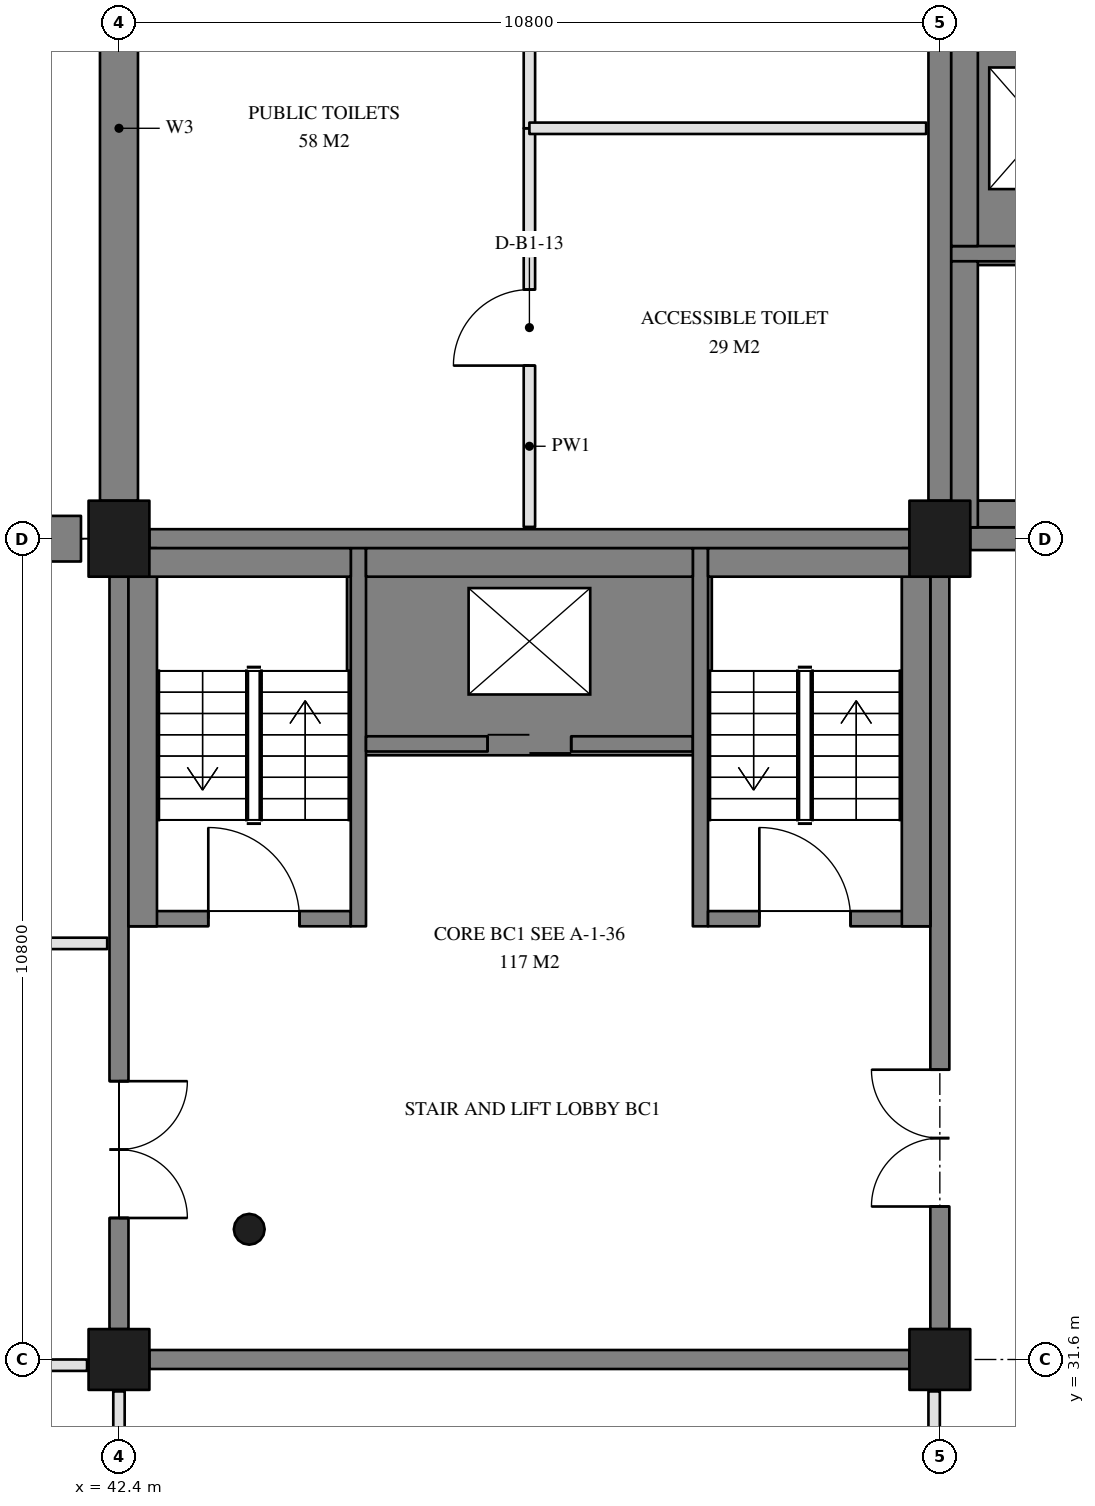
"""IFC4 building model, lengths in metres.
Left out: names, types, materials, properties, quantities, classifications, styles, units other than length and angle.
Written with IfcOpenShell. Run it as: python <this file> out.ifc"""

import sys

from ifc_helpers import new_model, si_unit, direction, frame, frame_2d, origin, origin_2d, place, context, subcontext, project, spatial, polyline, rectangle, hollow_circle, outline, extrude, element, fill, save


model = new_model("IFC4")
c1 = context("Model", 3, precision=1e-05, world=origin(), true_north=direction((0.0, 1.0)))
c2 = subcontext(c1, "Body", "Model", "MODEL_VIEW")
j1 = project(units=[si_unit("LENGTHUNIT", "METRE"), si_unit("PLANEANGLEUNIT", "RADIAN")], contexts=[c1])
p1 = place(None, origin())
s1 = spatial("IfcSite", under=j1, at=p1, CompositionType="ELEMENT")
p2 = place(p1, origin())
s2 = spatial("IfcBuilding", under=s1, at=p2, CompositionType="ELEMENT")
p3 = place(p2, frame((0.0, 0.0, -5.4)))
s3 = spatial("IfcBuildingStorey", under=s2, at=p3, CompositionType="ELEMENT", Elevation=-5.4)
for number, where, z_axis, x_axis in (
    (1, (42.4, 42.4, -0.4), (0.0, 0.0, 1.0), (1.0, 0.0, 0.0)),
    (2, (53.2, 42.4, -0.4), (0.0, 0.0, 1.0), (1.0, 0.0, 0.0)),
):
    element("IfcColumn", number, at=place(p3, frame(where, z_axis=z_axis, x_axis=x_axis)), inside=s3, PredefinedType="COLUMN", context=c2, shape_type="SweptSolid", body=[
        extrude(rectangle(XDim=0.8, YDim=1.0, at=origin_2d()), origin(), (0.0, 0.0, 1.0), 5.8),
    ])
for number, where, z_axis, x_axis in (
    (3, (42.4, 31.6, -0.4), (0.0, 0.0, 1.0), (1.0, 0.0, 0.0)),
    (4, (53.2, 31.6, -0.4), (0.0, 0.0, 1.0), (1.0, 0.0, 0.0)),
):
    element("IfcColumn", number, at=place(p3, frame(where, z_axis=z_axis, x_axis=x_axis)), inside=s3, PredefinedType="COLUMN", context=c2, shape_type="SweptSolid", body=[
        extrude(rectangle(XDim=0.8, YDim=0.8, at=origin_2d()), origin(), (0.0, 0.0, 1.0), 5.8),
    ])
p4 = place(p3, frame((44.114, 33.314, 3.6), z_axis=(0.0, 0.0, 1.0), x_axis=(1.0, 0.0, 0.0)))
e5 = element("IfcColumn", 5, at=p4, inside=s3, PredefinedType="COLUMN", context=c2, shape_type="SweptSolid", body=[
    extrude(hollow_circle(Radius=0.203, WallThickness=0.016, at=origin_2d()), origin(), (0.0, 0.0, 1.0), 1.8),
])
p5 = place(p3, frame((0.0, 0.0, -1.4)))
e6 = element("IfcWall", 6, at=p5, inside=s3, PredefinedType="SOLIDWALL", context=c2, shape_type="SweptSolid", body=[
    extrude(outline(polyline([(45.4, 39.55), (50.2, 39.55), (50.2, 42.15), (45.4, 42.15), (45.4, 39.55)]), holes=[polyline([(49.95, 39.8), (49.95, 41.9), (45.65, 41.9), (45.65, 39.8), (49.95, 39.8)])]), origin(), (0.0, 0.0, 1.0), 1.4),
])
p6 = place(p3, frame((0.0, 0.0, -1.4)))
e7 = element("IfcWall", 7, at=p6, inside=s3, PredefinedType="SOLIDWALL", context=c2, shape_type="SweptSolid", body=[
    extrude(outline(polyline([(56.05, 46.0), (56.05, 49.6), (53.45, 49.6), (53.45, 46.0), (56.05, 46.0)]), holes=[polyline([(55.8, 49.35), (53.7, 49.35), (53.7, 46.25), (55.8, 46.25), (55.8, 49.35)])]), origin(), (0.0, 0.0, 1.0), 1.4),
])
p7 = place(p3, frame((53.6, 42.4, 0.0), z_axis=(0.0, 0.0, 1.0), x_axis=(1.0, 0.0, 0.0)))
e8 = element("IfcWall", 8, at=p7, inside=s3, PredefinedType="SOLIDWALL", context=c2, shape_type="SweptSolid", body=[
    extrude(rectangle(XDim=10.0, YDim=0.3, at=frame_2d((5.0, 0.0))), origin(), (0.0, 0.0, 1.0), 5.4),
])
p8 = place(p7, frame((7.775, 0.0, 0.0)))
e9 = element("IfcOpeningElement", 9, at=p8, cuts=e8, PredefinedType="OPENING", context=c2, shape_type="SweptSolid", body=[
    extrude(rectangle(XDim=1.8, YDim=2.1, at=frame_2d((0.9, 1.05))), frame((0.0, 0.16, 0.0), z_axis=(0.0, -1.0, 0.0), x_axis=(1.0, 0.0, 0.0)), (0.0, 0.0, 1.0), 0.32),
])
p9 = place(p3, frame((53.2, 52.7, 0.0), z_axis=(0.0, 0.0, 1.0), x_axis=(0.0, -1.0, 0.0)))
e10 = element("IfcWall", 10, at=p9, inside=s3, PredefinedType="SOLIDWALL", context=c2, shape_type="SweptSolid", body=[
    extrude(rectangle(XDim=9.8, YDim=0.3, at=frame_2d((4.9, 0.0))), origin(), (0.0, 0.0, 1.0), 5.4),
])
p10 = place(p3, frame((42.8, 31.6, 0.0), z_axis=(0.0, 0.0, 1.0), x_axis=(1.0, 0.0, 0.0)))
e11 = element("IfcWall", 11, at=p10, inside=s3, PredefinedType="SOLIDWALL", context=c2, shape_type="SweptSolid", body=[
    extrude(rectangle(XDim=10.0, YDim=0.25, at=frame_2d((5.0, 0.0))), origin(), (0.0, 0.0, 1.0), 5.4),
])
p11 = place(p3, frame((53.2, 32.0, 0.0), z_axis=(0.0, 0.0, 1.0), x_axis=(0.0, 1.0, 0.0)))
e12 = element("IfcWall", 12, at=p11, inside=s3, PredefinedType="SOLIDWALL", context=c2, shape_type="SweptSolid", body=[
    extrude(rectangle(XDim=9.9, YDim=0.25, at=frame_2d((4.95, 0.0))), origin(), (0.0, 0.0, 1.0), 5.4),
])
p12 = place(p11, frame((1.613, 0.0, 0.0)))
e13 = element("IfcOpeningElement", 13, at=p12, cuts=e12, PredefinedType="OPENING", context=c2, shape_type="SweptSolid", body=[
    extrude(rectangle(XDim=1.8, YDim=2.1, at=frame_2d((0.9, 1.05))), frame((0.0, 0.135, 0.0), z_axis=(0.0, -1.0, 0.0), x_axis=(1.0, 0.0, 0.0)), (0.0, 0.0, 1.0), 0.27),
])
p13 = place(p3, frame((52.8, 42.4, 0.0), z_axis=(0.0, 0.0, 1.0), x_axis=(-1.0, 0.0, 0.0)))
e14 = element("IfcWall", 14, at=p13, inside=s3, PredefinedType="SOLIDWALL", context=c2, shape_type="SweptSolid", body=[
    extrude(rectangle(XDim=10.0, YDim=0.25, at=frame_2d((5.0, 0.0))), origin(), (0.0, 0.0, 1.0), 5.4),
])
p14 = place(p3, frame((42.4, 41.9, 0.0), z_axis=(0.0, 0.0, 1.0), x_axis=(0.0, -1.0, 0.0)))
e15 = element("IfcWall", 15, at=p14, inside=s3, PredefinedType="SOLIDWALL", context=c2, shape_type="SweptSolid", body=[
    extrude(rectangle(XDim=9.9, YDim=0.25, at=frame_2d((4.95, 0.0))), origin(), (0.0, 0.0, 1.0), 5.4),
])
p15 = place(p14, frame((6.638, 0.0, 0.0)))
e16 = element("IfcOpeningElement", 16, at=p15, cuts=e15, PredefinedType="OPENING", context=c2, shape_type="SweptSolid", body=[
    extrude(rectangle(XDim=1.8, YDim=2.1, at=frame_2d((0.9, 1.05))), frame((0.0, 0.135, 0.0), z_axis=(0.0, -1.0, 0.0), x_axis=(1.0, 0.0, 0.0)), (0.0, 0.0, 1.0), 0.27),
])
p16 = place(p3, frame((31.9, 42.4, 0.0), z_axis=(0.0, 0.0, 1.0), x_axis=(1.0, 0.0, 0.0)))
e17 = element("IfcWall", 17, at=p16, inside=s3, PredefinedType="SOLIDWALL", context=c2, shape_type="SweptSolid", body=[
    extrude(rectangle(XDim=10.0, YDim=0.6, at=frame_2d((5.0, 0.0))), origin(), (0.0, 0.0, 1.0), 3.9),
])
p17 = place(p3, frame((42.4, 42.9, 0.0), z_axis=(0.0, 0.0, 1.0), x_axis=(0.0, 1.0, 0.0)))
e18 = element("IfcWall", 18, at=p17, inside=s3, PredefinedType="SOLIDWALL", context=c2, shape_type="SweptSolid", body=[
    extrude(rectangle(XDim=9.8, YDim=0.5, at=frame_2d((4.9, 0.0))), origin(), (0.0, 0.0, 1.0), 3.8),
])
p18 = place(p3, frame((60.7, 46.15, 0.0), z_axis=(0.0, 0.0, 1.0), x_axis=(-1.0, 0.0, 0.0)))
e19 = element("IfcWall", 19, at=p18, inside=s3, PredefinedType="SOLIDWALL", context=c2, shape_type="SweptSolid", body=[
    extrude(rectangle(XDim=7.35, YDim=0.2, at=frame_2d((3.675, 0.0))), origin(), (0.0, 0.0, 1.0), 4.8),
])
p19 = place(p3, frame((60.7, 42.725, 0.0), z_axis=(0.0, 0.0, 1.0), x_axis=(-1.0, 0.0, 0.0)))
e20 = element("IfcWall", 20, at=p19, inside=s3, PredefinedType="SOLIDWALL", context=c2, shape_type="SweptSolid", body=[
    extrude(rectangle(XDim=7.35, YDim=0.35, at=frame_2d((3.675, 0.0))), origin(), (0.0, 0.0, 1.0), 4.8),
])
p20 = place(p3, frame((53.525, 42.55, 0.0), z_axis=(0.0, 0.0, 1.0), x_axis=(0.0, 1.0, 0.0)))
e21 = element("IfcWall", 21, at=p20, inside=s3, PredefinedType="SOLIDWALL", context=c2, shape_type="SweptSolid", body=[
    extrude(rectangle(XDim=3.5, YDim=0.35, at=frame_2d((1.75, 0.0))), origin(), (0.0, 0.0, 1.0), 4.8),
])
p21 = place(p3, frame((53.525, 46.25, 0.0), z_axis=(0.0, 0.0, 1.0), x_axis=(0.0, 1.0, 0.0)))
e22 = element("IfcWall", 22, at=p21, inside=s3, PredefinedType="SOLIDWALL", context=c2, shape_type="SweptSolid", body=[
    extrude(rectangle(XDim=3.1, YDim=0.35, at=frame_2d((1.55, 0.0))), origin(), (0.0, 0.0, 1.0), 4.8),
])
p22 = place(p3, frame((42.525, 37.4, 0.0), z_axis=(0.0, 0.0, 1.0), x_axis=(1.0, 0.0, 0.0)))
e23 = element("IfcWall", 23, at=p22, inside=s3, PredefinedType="SOLIDWALL", context=c2, shape_type="SweptSolid", body=[
    extrude(rectangle(XDim=2.925, YDim=0.2, at=frame_2d((1.462, 0.0))), origin(), (0.0, 0.0, 1.0), 4.8),
])
p23 = place(p22, frame((1.05, 0.0, 0.0)))
e24 = element("IfcOpeningElement", 24, at=p23, cuts=e23, PredefinedType="OPENING", context=c2, shape_type="SweptSolid", body=[
    extrude(rectangle(XDim=1.2, YDim=2.1, at=frame_2d((0.6, 1.05))), frame((0.0, 0.11, 0.0), z_axis=(0.0, -1.0, 0.0), x_axis=(1.0, 0.0, 0.0)), (0.0, 0.0, 1.0), 0.22),
])
p24 = place(p3, frame((45.55, 37.3, 0.0), z_axis=(0.0, 0.0, 1.0), x_axis=(0.0, 1.0, 0.0)))
e25 = element("IfcWall", 25, at=p24, inside=s3, PredefinedType="SOLIDWALL", context=c2, shape_type="SweptSolid", body=[
    extrude(rectangle(XDim=4.975, YDim=0.2, at=frame_2d((2.487, 0.0))), origin(), (0.0, 0.0, 1.0), 4.8),
])
p25 = place(p3, frame((45.65, 39.7, 0.0), z_axis=(0.0, 0.0, 1.0), x_axis=(1.0, 0.0, 0.0)))
e26 = element("IfcWall", 26, at=p25, inside=s3, PredefinedType="SOLIDWALL", context=c2, shape_type="SweptSolid", body=[
    extrude(rectangle(XDim=4.3, YDim=0.2, at=frame_2d((2.15, 0.0))), origin(), (0.0, 0.0, 1.0), 4.8),
])
p26 = place(p25, frame((1.6, 0.0, 0.0)))
e27 = element("IfcOpeningElement", 27, at=p26, cuts=e26, PredefinedType="OPENING", context=c2, shape_type="SweptSolid", body=[
    extrude(rectangle(XDim=1.1, YDim=2.1, at=frame_2d((0.55, 1.05))), frame((0.0, 0.11, 0.0), z_axis=(0.0, -1.0, 0.0), x_axis=(1.0, 0.0, 0.0)), (0.0, 0.0, 1.0), 0.22),
])
p27 = place(p3, frame((50.05, 37.3, 0.0), z_axis=(0.0, 0.0, 1.0), x_axis=(0.0, 1.0, 0.0)))
e28 = element("IfcWall", 28, at=p27, inside=s3, PredefinedType="SOLIDWALL", context=c2, shape_type="SweptSolid", body=[
    extrude(rectangle(XDim=4.975, YDim=0.2, at=frame_2d((2.487, 0.0))), origin(), (0.0, 0.0, 1.0), 4.8),
])
p28 = place(p3, frame((50.15, 37.4, 0.0), z_axis=(0.0, 0.0, 1.0), x_axis=(1.0, 0.0, 0.0)))
e29 = element("IfcWall", 29, at=p28, inside=s3, PredefinedType="SOLIDWALL", context=c2, shape_type="SweptSolid", body=[
    extrude(rectangle(XDim=2.925, YDim=0.2, at=frame_2d((1.462, 0.0))), origin(), (0.0, 0.0, 1.0), 4.8),
])
p29 = place(p28, frame((0.675, 0.0, 0.0)))
e30 = element("IfcOpeningElement", 30, at=p29, cuts=e29, PredefinedType="OPENING", context=c2, shape_type="SweptSolid", body=[
    extrude(rectangle(XDim=1.2, YDim=2.1, at=frame_2d((0.6, 1.05))), frame((0.0, 0.11, 0.0), z_axis=(0.0, -1.0, 0.0), x_axis=(1.0, 0.0, 0.0)), (0.0, 0.0, 1.0), 0.22),
])
p30 = place(p3, frame((42.712, 37.3, 0.0), z_axis=(0.0, 0.0, 1.0), x_axis=(0.0, 1.0, 0.0)))
e31 = element("IfcWall", 31, at=p30, inside=s3, PredefinedType="SOLIDWALL", context=c2, shape_type="SweptSolid", body=[
    extrude(rectangle(XDim=4.975, YDim=0.375, at=frame_2d((2.487, 0.0))), origin(), (0.0, 0.0, 1.0), 4.8),
])
p31 = place(p3, frame((42.525, 42.087, 0.0), z_axis=(0.0, 0.0, 1.0), x_axis=(1.0, 0.0, 0.0)))
e32 = element("IfcWall", 32, at=p31, inside=s3, PredefinedType="SOLIDWALL", context=c2, shape_type="SweptSolid", body=[
    extrude(rectangle(XDim=2.925, YDim=0.375, at=frame_2d((1.462, 0.0))), origin(), (0.0, 0.0, 1.0), 4.8),
])
p32 = place(p3, frame((52.887, 37.3, 0.0), z_axis=(0.0, 0.0, 1.0), x_axis=(0.0, 1.0, 0.0)))
e33 = element("IfcWall", 33, at=p32, inside=s3, PredefinedType="SOLIDWALL", context=c2, shape_type="SweptSolid", body=[
    extrude(rectangle(XDim=4.975, YDim=0.375, at=frame_2d((2.487, 0.0))), origin(), (0.0, 0.0, 1.0), 4.8),
])
p33 = place(p3, frame((50.15, 42.087, 0.0), z_axis=(0.0, 0.0, 1.0), x_axis=(1.0, 0.0, 0.0)))
e34 = element("IfcWall", 34, at=p33, inside=s3, PredefinedType="SOLIDWALL", context=c2, shape_type="SweptSolid", body=[
    extrude(rectangle(XDim=2.925, YDim=0.375, at=frame_2d((1.462, 0.0))), origin(), (0.0, 0.0, 1.0), 4.8),
])
p34 = place(p3, frame((45.65, 42.087, 0.0), z_axis=(0.0, 0.0, 1.0), x_axis=(1.0, 0.0, 0.0)))
e35 = element("IfcWall", 35, at=p34, inside=s3, PredefinedType="SOLIDWALL", context=c2, shape_type="SweptSolid", body=[
    extrude(rectangle(XDim=4.3, YDim=0.375, at=frame_2d((2.15, 0.0))), origin(), (0.0, 0.0, 1.0), 4.8),
])
p35 = place(p3, frame((47.8, 42.555, 0.0), z_axis=(0.0, 0.0, 1.0), x_axis=(0.0, 1.0, 0.0)))
e36 = element("IfcWall", 36, at=p35, inside=s3, PredefinedType="PARTITIONING", context=c2, shape_type="SweptSolid", body=[
    extrude(rectangle(XDim=5.245, YDim=0.15, at=frame_2d((2.623, 0.0))), origin(), (0.0, 0.0, 1.0), 4.8),
])
p36 = place(p35, frame((2.123, 0.0, 0.0)))
e37 = element("IfcOpeningElement", 37, at=p36, cuts=e36, PredefinedType="OPENING", context=c2, shape_type="SweptSolid", body=[
    extrude(rectangle(XDim=1.0, YDim=2.1, at=frame_2d((0.5, 1.05))), frame((0.0, 0.085, 0.0), z_axis=(0.0, -1.0, 0.0), x_axis=(1.0, 0.0, 0.0)), (0.0, 0.0, 1.0), 0.17),
])
p37 = place(p3, frame((47.8, 47.8, 0.0), z_axis=(0.0, 0.0, 1.0), x_axis=(0.0, 1.0, 0.0)))
e38 = element("IfcWall", 38, at=p37, inside=s3, PredefinedType="PARTITIONING", context=c2, shape_type="SweptSolid", body=[
    extrude(rectangle(XDim=3.6, YDim=0.15, at=frame_2d((1.8, 0.0))), origin(), (0.0, 0.0, 1.0), 4.8),
])
p38 = place(p37, frame((1.3, 0.0, 0.0)))
e39 = element("IfcOpeningElement", 39, at=p38, cuts=e38, PredefinedType="OPENING", context=c2, shape_type="SweptSolid", body=[
    extrude(rectangle(XDim=1.0, YDim=2.1, at=frame_2d((0.5, 1.05))), frame((0.0, 0.085, 0.0), z_axis=(0.0, -1.0, 0.0), x_axis=(1.0, 0.0, 0.0)), (0.0, 0.0, 1.0), 0.17),
])
p39 = place(p3, frame((47.8, 47.8, 0.0), z_axis=(0.0, 0.0, 1.0), x_axis=(1.0, 0.0, 0.0)))
e40 = element("IfcWall", 40, at=p39, inside=s3, PredefinedType="PARTITIONING", context=c2, shape_type="SweptSolid", body=[
    extrude(rectangle(XDim=5.22, YDim=0.15, at=frame_2d((2.61, 0.0))), origin(), (0.0, 0.0, 1.0), 4.8),
])
p40 = place(p3, frame((53.125, 24.4, 0.0), z_axis=(0.0, 0.0, 1.0), x_axis=(0.0, 1.0, 0.0)))
e41 = element("IfcWall", 41, at=p40, inside=s3, PredefinedType="PARTITIONING", context=c2, shape_type="SweptSolid", body=[
    extrude(rectangle(XDim=6.78, YDim=0.15, at=frame_2d((3.39, 0.0))), origin(), (0.0, 0.0, 1.0), 3.8),
])
p41 = place(p3, frame((42.4, 24.4, 0.0), z_axis=(0.0, 0.0, 1.0), x_axis=(0.0, 1.0, 0.0)))
e42 = element("IfcWall", 42, at=p41, inside=s3, PredefinedType="PARTITIONING", context=c2, shape_type="SweptSolid", body=[
    extrude(rectangle(XDim=6.78, YDim=0.15, at=frame_2d((3.39, 0.0))), origin(), (0.0, 0.0, 1.0), 3.9),
])
p42 = place(p3, frame((31.92, 31.525, 0.0), z_axis=(0.0, 0.0, 1.0), x_axis=(1.0, 0.0, 0.0)))
e43 = element("IfcWall", 43, at=p42, inside=s3, PredefinedType="PARTITIONING", context=c2, shape_type="SweptSolid", body=[
    extrude(rectangle(XDim=10.06, YDim=0.15, at=frame_2d((5.03, 0.0))), origin(), (0.0, 0.0, 1.0), 3.6),
])
p43 = place(p42, frame((4.13, 0.0, 0.0)))
e44 = element("IfcOpeningElement", 44, at=p43, cuts=e43, PredefinedType="OPENING", context=c2, shape_type="SweptSolid", body=[
    extrude(rectangle(XDim=1.8, YDim=2.1, at=frame_2d((0.9, 1.05))), frame((0.0, 0.085, 0.0), z_axis=(0.0, -1.0, 0.0), x_axis=(1.0, 0.0, 0.0)), (0.0, 0.0, 1.0), 0.17),
])
p44 = place(p3, frame((31.6, 37.075, 0.0), z_axis=(0.0, 0.0, 1.0), x_axis=(1.0, 0.0, 0.0)))
e45 = element("IfcWall", 45, at=p44, inside=s3, PredefinedType="PARTITIONING", context=c2, shape_type="SweptSolid", body=[
    extrude(rectangle(XDim=10.645, YDim=0.15, at=frame_2d((5.323, 0.0))), origin(), (0.0, 0.0, 1.0), 3.6),
])
p45 = place(p44, frame((4.823, 0.0, 0.0)))
e46 = element("IfcOpeningElement", 46, at=p45, cuts=e45, PredefinedType="OPENING", context=c2, shape_type="SweptSolid", body=[
    extrude(rectangle(XDim=1.0, YDim=2.1, at=frame_2d((0.5, 1.05))), frame((0.0, 0.085, 0.0), z_axis=(0.0, -1.0, 0.0), x_axis=(1.0, 0.0, 0.0)), (0.0, 0.0, 1.0), 0.17),
])
p46 = place(p26, frame((1.1, 0.0, 0.0), z_axis=(0.0, 0.0, 1.0), x_axis=(-1.0, 0.0, 0.0)))
e47 = element("IfcDoor", 47, at=p46, inside=s3, OperationType="DOUBLE_DOOR_SLIDING", PredefinedType="DOOR", context=c2, shape_type="SweptSolid", body=[
    extrude(rectangle(XDim=1.1, YDim=2.1, at=frame_2d((0.55, 1.05))), frame((0.0, 0.025, 0.0), z_axis=(0.0, -1.0, 0.0), x_axis=(1.0, 0.0, 0.0)), (0.0, 0.0, 1.0), 0.05),
])
fill(e27, e47)
p47 = place(p23, frame((1.2, 0.0, 0.0), z_axis=(0.0, 0.0, 1.0), x_axis=(-1.0, 0.0, 0.0)))
e48 = element("IfcDoor", 48, at=p47, inside=s3, OperationType="SINGLE_SWING_LEFT", PredefinedType="DOOR", context=c2, shape_type="SweptSolid", body=[
    extrude(rectangle(XDim=1.2, YDim=2.1, at=frame_2d((0.6, 1.05))), frame((0.0, 0.025, 0.0), z_axis=(0.0, -1.0, 0.0), x_axis=(1.0, 0.0, 0.0)), (0.0, 0.0, 1.0), 0.05),
])
fill(e24, e48)
p48 = place(p29, frame((1.2, 0.0, 0.0), z_axis=(0.0, 0.0, 1.0), x_axis=(-1.0, 0.0, 0.0)))
e49 = element("IfcDoor", 49, at=p48, inside=s3, OperationType="SINGLE_SWING_RIGHT", PredefinedType="DOOR", context=c2, shape_type="SweptSolid", body=[
    extrude(rectangle(XDim=1.2, YDim=2.1, at=frame_2d((0.6, 1.05))), frame((0.0, 0.025, 0.0), z_axis=(0.0, -1.0, 0.0), x_axis=(1.0, 0.0, 0.0)), (0.0, 0.0, 1.0), 0.05),
])
fill(e30, e49)
p49 = place(p12, frame((1.8, 0.0, 0.0), z_axis=(0.0, 0.0, 1.0), x_axis=(-1.0, 0.0, 0.0)))
e50 = element("IfcDoor", 50, at=p49, inside=s3, OperationType="DOUBLE_DOOR_DOUBLE_SWING", PredefinedType="DOOR", context=c2, shape_type="SweptSolid", body=[
    extrude(rectangle(XDim=1.8, YDim=2.1, at=frame_2d((0.9, 1.05))), frame((0.0, 0.025, 0.0), z_axis=(0.0, -1.0, 0.0), x_axis=(1.0, 0.0, 0.0)), (0.0, 0.0, 1.0), 0.05),
])
fill(e13, e50)
p50 = place(p15, frame((1.8, 0.0, 0.0), z_axis=(0.0, 0.0, 1.0), x_axis=(-1.0, 0.0, 0.0)))
e51 = element("IfcDoor", 51, at=p50, inside=s3, OperationType="DOUBLE_DOOR_DOUBLE_SWING", PredefinedType="DOOR", context=c2, shape_type="SweptSolid", body=[
    extrude(rectangle(XDim=1.8, YDim=2.1, at=frame_2d((0.9, 1.05))), frame((0.0, 0.025, 0.0), z_axis=(0.0, -1.0, 0.0), x_axis=(1.0, 0.0, 0.0)), (0.0, 0.0, 1.0), 0.05),
])
fill(e16, e51)
p51 = place(p36, frame((1.0, 0.0, 0.0), z_axis=(0.0, 0.0, 1.0), x_axis=(-1.0, 0.0, 0.0)))
e52 = element("IfcDoor", 52, at=p51, inside=s3, OperationType="SINGLE_SWING_RIGHT", PredefinedType="DOOR", context=c2, shape_type="SweptSolid", body=[
    extrude(rectangle(XDim=1.0, YDim=2.1, at=frame_2d((0.5, 1.05))), frame((0.0, 0.025, 0.0), z_axis=(0.0, -1.0, 0.0), x_axis=(1.0, 0.0, 0.0)), (0.0, 0.0, 1.0), 0.05),
])
fill(e37, e52)
save(model, sys.argv[1])
